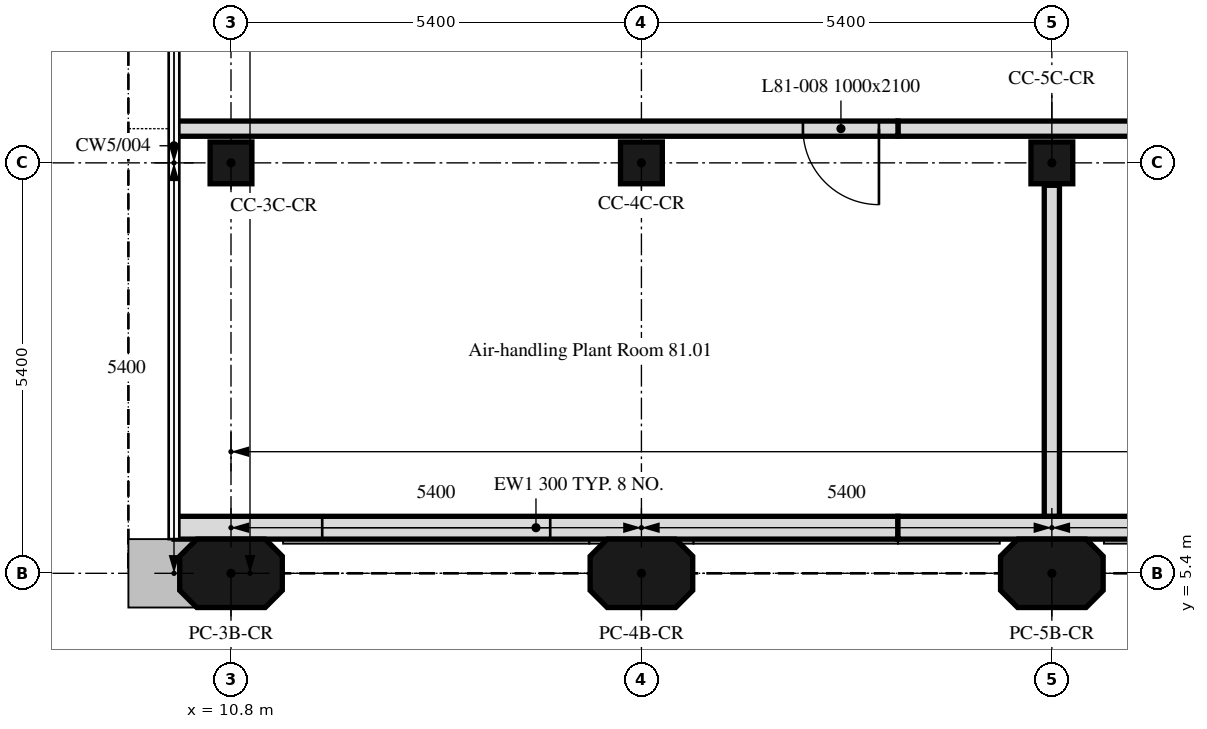
"""IFC4 building model, lengths in metres.
Left out: names, types, materials, properties, quantities, classifications, styles, units other than length and angle.
Written with IfcOpenShell. Run it as: python <this file> out.ifc"""

import sys

from ifc_helpers import new_model, si_unit, direction, frame, frame_2d, origin, origin_2d, place, context, subcontext, project, spatial, polyline, rectangle, outline, extrude, element, fill, save


model = new_model("IFC4")
c1 = context("Model", 3, precision=1e-05, world=origin(), true_north=direction((0.0, 1.0)))
c2 = subcontext(c1, "Body", "Model", "MODEL_VIEW")
j1 = project(units=[si_unit("LENGTHUNIT", "METRE"), si_unit("PLANEANGLEUNIT", "RADIAN")], contexts=[c1])
p1 = place(None, origin())
s1 = spatial("IfcSite", under=j1, at=p1, CompositionType="ELEMENT")
p2 = place(p1, origin())
s2 = spatial("IfcBuilding", under=s1, at=p2, CompositionType="ELEMENT")
p3 = place(p2, frame((0.0, 0.0, 326.2)))
s3 = spatial("IfcBuildingStorey", under=s2, at=p3, CompositionType="ELEMENT", Elevation=326.2)
p4 = place(p3, frame((10.8, 5.4, 0.0), z_axis=(0.0, 0.0, 1.0), x_axis=(1.0, 0.0, 0.0)))
e1 = element("IfcColumn", 1, at=p4, inside=s3, PredefinedType="COLUMN", context=c2, shape_type="SweptSolid", body=[
    extrude(outline(polyline([(-0.45, -0.45), (0.45, -0.45), (0.675, -0.225), (0.675, 0.225), (0.45, 0.45), (-0.45, 0.45), (-0.675, 0.225), (-0.675, -0.225), (-0.45, -0.45)])), origin(), (0.0, 0.0, 1.0), 3.3),
])
for number, where, z_axis, x_axis in (
    (2, (16.2, 5.4, 0.0), (0.0, 0.0, 1.0), (1.0, 0.0, 0.0)),
    (3, (21.6, 5.4, 0.0), (0.0, 0.0, 1.0), (1.0, 0.0, 0.0)),
):
    element("IfcColumn", number, at=place(p3, frame(where, z_axis=z_axis, x_axis=x_axis)), inside=s3, PredefinedType="COLUMN", context=c2, shape_type="SweptSolid", body=[
        extrude(outline(polyline([(-0.45, -0.45), (0.45, -0.45), (0.675, -0.225), (0.675, 0.225), (0.45, 0.45), (-0.45, 0.45), (-0.675, 0.225), (-0.675, -0.225), (-0.45, -0.45)])), origin(), (0.0, 0.0, 1.0), 4.2),
    ])
p5 = place(p3, frame((10.8, 10.8, 0.0), z_axis=(0.0, 0.0, 1.0), x_axis=(1.0, 0.0, 0.0)))
e4 = element("IfcColumn", 4, at=p5, inside=s3, PredefinedType="COLUMN", context=c2, shape_type="SweptSolid", body=[
    extrude(rectangle(XDim=0.55, YDim=0.55, at=origin_2d()), origin(), (0.0, 0.0, 1.0), 3.3),
])
for number, where, z_axis, x_axis in (
    (5, (16.2, 10.8, 0.0), (0.0, 0.0, 1.0), (1.0, 0.0, 0.0)),
    (6, (21.6, 10.8, 0.0), (0.0, 0.0, 1.0), (1.0, 0.0, 0.0)),
):
    element("IfcColumn", number, at=place(p3, frame(where, z_axis=z_axis, x_axis=x_axis)), inside=s3, PredefinedType="COLUMN", context=c2, shape_type="SweptSolid", body=[
        extrude(rectangle(XDim=0.55, YDim=0.55, at=origin_2d()), origin(), (0.0, 0.0, 1.0), 4.2),
    ])
p6 = place(p3, frame((10.05, 6.0, 0.0), z_axis=(0.0, 0.0, 1.0), x_axis=(1.0, 0.0, 0.0)))
e7 = element("IfcWall", 7, at=p6, inside=s3, PredefinedType="SOLIDWALL", context=c2, shape_type="SweptSolid", body=[
    extrude(outline(polyline([(0.0, 0.0), (9.525, 0.0), (9.525, 4.2), (8.93, 6.936), (8.334, 6.671), (7.739, 6.406), (7.144, 6.142), (6.548, 5.877), (5.953, 5.613), (5.358, 5.348), (4.762, 5.083), (4.167, 4.819), (3.572, 4.554), (2.977, 4.29), (2.381, 4.025), (1.786, 3.76), (1.191, 3.496), (0.595, 3.231), (0.0, 2.967), (0.0, 0.0)])), frame((0.0, 0.15, 0.0), z_axis=(0.0, -1.0, 0.0), x_axis=(1.0, 0.0, 0.0)), (0.0, 0.0, 1.0), 0.3),
])
p7 = place(p6, frame((1.95, 0.0, 0.6)))
e8 = element("IfcOpeningElement", 8, at=p7, cuts=e7, PredefinedType="OPENING", context=c2, shape_type="SweptSolid", body=[
    extrude(rectangle(XDim=3.0, YDim=1.8, at=frame_2d((1.5, 0.9))), frame((0.0, 0.16, 0.0), z_axis=(0.0, -1.0, 0.0), x_axis=(1.0, 0.0, 0.0)), (0.0, 0.0, 1.0), 0.32),
])
p8 = place(p3, frame((19.575, 6.0, 0.0), z_axis=(0.0, 0.0, 1.0), x_axis=(1.0, 0.0, 0.0)))
e9 = element("IfcWall", 9, at=p8, inside=s3, PredefinedType="SOLIDWALL", context=c2, shape_type="SweptSolid", body=[
    extrude(outline(polyline([(0.0, 0.0), (18.039, 0.0), (18.039, 4.2), (17.457, 4.2), (16.875, 4.2), (16.293, 4.2), (15.711, 4.2), (15.129, 4.2), (14.547, 4.2), (13.965, 4.2), (13.384, 4.2), (12.802, 4.2), (12.22, 4.2), (11.638, 4.2), (11.056, 4.2), (10.474, 4.2), (9.892, 4.2), (9.31, 4.2), (8.728, 4.2), (8.146, 4.2), (7.565, 4.2), (6.983, 4.2), (6.401, 4.2), (5.819, 4.2), (5.237, 4.2), (4.655, 4.2), (4.073, 4.2), (3.491, 4.2), (2.909, 4.2), (2.328, 4.2), (1.746, 4.2), (1.164, 4.2), (0.582, 4.2), (0.0, 4.2), (0.0, 0.0)])), frame((0.0, 0.15, 0.0), z_axis=(0.0, -1.0, 0.0), x_axis=(1.0, 0.0, 0.0)), (0.0, 0.0, 1.0), 0.3),
])
p9 = place(p8, frame((3.225, 0.0, 0.6)))
e10 = element("IfcOpeningElement", 10, at=p9, cuts=e9, PredefinedType="OPENING", context=c2, shape_type="SweptSolid", body=[
    extrude(rectangle(XDim=3.0, YDim=1.8, at=frame_2d((1.5, 0.9))), frame((0.0, 0.16, 0.0), z_axis=(0.0, -1.0, 0.0), x_axis=(1.0, 0.0, 0.0)), (0.0, 0.0, 1.0), 0.32),
])
p10 = place(p8, frame((8.625, 0.0, 0.6)))
e11 = element("IfcOpeningElement", 11, at=p10, cuts=e9, PredefinedType="OPENING", context=c2, shape_type="SweptSolid", body=[
    extrude(rectangle(XDim=3.0, YDim=1.8, at=frame_2d((1.5, 0.9))), frame((0.0, 0.16, 0.0), z_axis=(0.0, -1.0, 0.0), x_axis=(1.0, 0.0, 0.0)), (0.0, 0.0, 1.0), 0.32),
])
p11 = place(p8, frame((14.025, 0.0, 0.6)))
e12 = element("IfcOpeningElement", 12, at=p11, cuts=e9, PredefinedType="OPENING", context=c2, shape_type="SweptSolid", body=[
    extrude(rectangle(XDim=3.0, YDim=1.8, at=frame_2d((1.5, 0.9))), frame((0.0, 0.16, 0.0), z_axis=(0.0, -1.0, 0.0), x_axis=(1.0, 0.0, 0.0)), (0.0, 0.0, 1.0), 0.32),
])
p12 = place(p3, frame((21.6, 10.505, 0.0), z_axis=(0.0, 0.0, 1.0), x_axis=(0.0, -1.0, 0.0)))
e13 = element("IfcWall", 13, at=p12, inside=s3, PredefinedType="PARTITIONING", context=c2, shape_type="SweptSolid", body=[
    extrude(rectangle(XDim=4.354, YDim=0.2, at=frame_2d((2.177, 0.0))), origin(), (0.0, 0.0, 1.0), 4.2),
])
p13 = place(p3, frame((42.449, 11.25, 0.0), z_axis=(0.0, 0.0, 1.0), x_axis=(-1.0, 0.0, 0.0)))
e14 = element("IfcWall", 14, at=p13, inside=s3, PredefinedType="PARTITIONING", context=c2, shape_type="SweptSolid", body=[
    extrude(rectangle(XDim=22.874, YDim=0.2, at=frame_2d((11.437, 0.0))), origin(), (0.0, 0.0, 1.0), 4.2),
])
p14 = place(p13, frame((6.832, 0.0, 0.0)))
e15 = element("IfcOpeningElement", 15, at=p14, cuts=e14, PredefinedType="OPENING", context=c2, shape_type="SweptSolid", body=[
    extrude(rectangle(XDim=1.0, YDim=2.1, at=frame_2d((0.5, 1.05))), frame((0.0, 0.1, 0.0), z_axis=(0.0, -1.0, 0.0), x_axis=(1.0, 0.0, 0.0)), (0.0, 0.0, 1.0), 0.2),
])
p15 = place(p13, frame((12.266, 0.0, 0.0)))
e16 = element("IfcOpeningElement", 16, at=p15, cuts=e14, PredefinedType="OPENING", context=c2, shape_type="SweptSolid", body=[
    extrude(rectangle(XDim=1.0, YDim=2.1, at=frame_2d((0.5, 1.05))), frame((0.0, 0.1, 0.0), z_axis=(0.0, -1.0, 0.0), x_axis=(1.0, 0.0, 0.0)), (0.0, 0.0, 1.0), 0.2),
])
p16 = place(p3, frame((19.575, 11.25, 0.0), z_axis=(0.0, 0.0, 1.0), x_axis=(-1.0, 0.0, 0.0)))
e17 = element("IfcWall", 17, at=p16, inside=s3, PredefinedType="PARTITIONING", context=c2, shape_type="SweptSolid", body=[
    extrude(outline(polyline([(0.0, 0.0), (9.525, 0.0), (9.525, 2.967), (0.0, 4.2), (0.0, 0.0)])), frame((0.0, 0.1, 0.0), z_axis=(0.0, -1.0, 0.0), x_axis=(1.0, 0.0, 0.0)), (0.0, 0.0, 1.0), 0.2),
])
p17 = place(p16, frame((0.25, 0.0, 0.0)))
e18 = element("IfcOpeningElement", 18, at=p17, cuts=e17, PredefinedType="OPENING", context=c2, shape_type="SweptSolid", body=[
    extrude(rectangle(XDim=1.0, YDim=2.1, at=frame_2d((0.5, 1.05))), frame((0.0, 0.1, 0.0), z_axis=(0.0, -1.0, 0.0), x_axis=(1.0, 0.0, 0.0)), (0.0, 0.0, 1.0), 0.2),
])
p18 = place(p7, origin())
e19 = element("IfcWindow", 19, at=p18, inside=s3, PartitioningType="SINGLE_PANEL", PredefinedType="WINDOW", context=c2, shape_type="SweptSolid", body=[
    extrude(rectangle(XDim=3.0, YDim=1.8, at=frame_2d((1.5, 0.9))), frame((0.0, 0.03, 0.0), z_axis=(0.0, -1.0, 0.0), x_axis=(1.0, 0.0, 0.0)), (0.0, 0.0, 1.0), 0.06),
])
fill(e8, e19)
p19 = place(p17, origin())
e20 = element("IfcDoor", 20, at=p19, inside=s3, OperationType="SINGLE_SWING_RIGHT", PredefinedType="DOOR", context=c2, shape_type="SweptSolid", body=[
    extrude(rectangle(XDim=1.0, YDim=2.1, at=frame_2d((0.5, 1.05))), frame((0.0, 0.025, 0.0), z_axis=(0.0, -1.0, 0.0), x_axis=(1.0, 0.0, 0.0)), (0.0, 0.0, 1.0), 0.05),
])
fill(e18, e20)
save(model, sys.argv[1])
